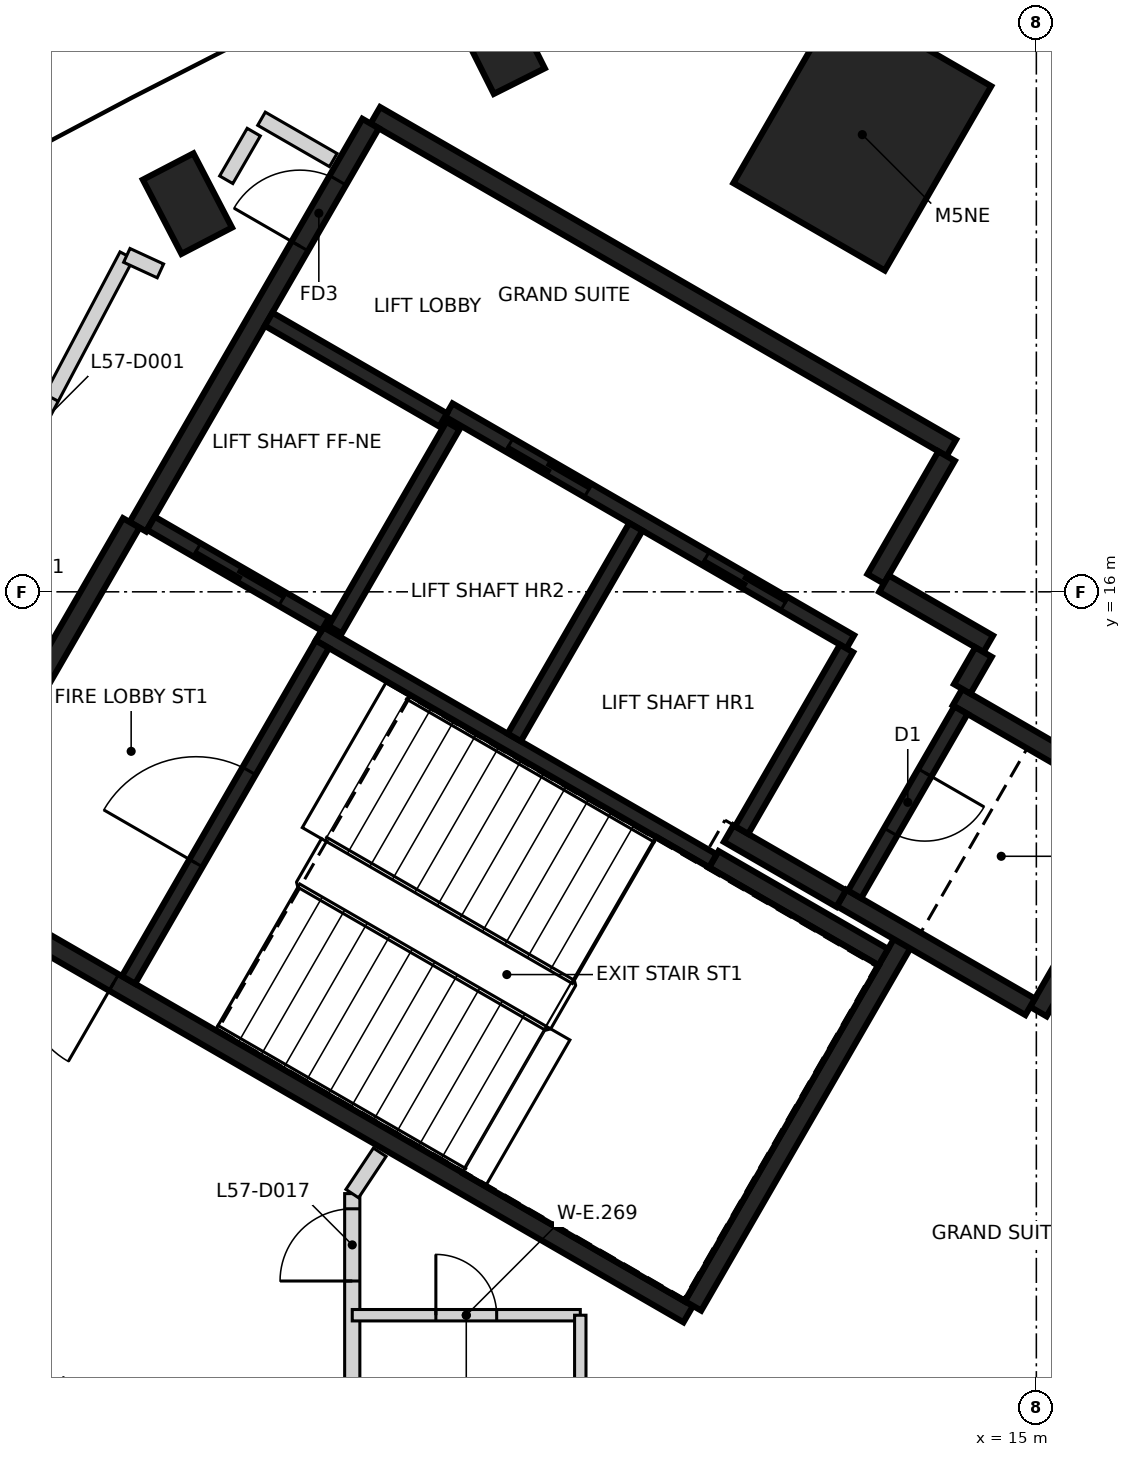
"""IFC4 building model, lengths in metres.
Left out: names, types, materials, properties, quantities, classifications, styles, units other than length and angle.
Written with IfcOpenShell. Run it as: python <this file> out.ifc"""

import sys

from ifc_helpers import new_model, si_unit, direction, frame, frame_2d, origin, origin_2d, place, context, subcontext, project, spatial, rectangle, extrude, element, fill, save


model = new_model("IFC4")
c1 = context("Model", 3, precision=1e-05, world=origin(), true_north=direction((0.0, 1.0)))
c2 = subcontext(c1, "Body", "Model", "MODEL_VIEW")
j1 = project(units=[si_unit("LENGTHUNIT", "METRE"), si_unit("PLANEANGLEUNIT", "RADIAN")], contexts=[c1])
p1 = place(None, origin())
s1 = spatial("IfcSite", under=j1, at=p1, CompositionType="ELEMENT")
p2 = place(p1, origin())
s2 = spatial("IfcBuilding", under=s1, at=p2, CompositionType="ELEMENT")
p3 = place(p2, frame((0.0, 0.0, 228.6)))
s3 = spatial("IfcBuildingStorey", under=s2, at=p3, CompositionType="ELEMENT", Elevation=228.6)
for number, where, z_axis, x_axis in (
    (1, (7.951, 23.211, -0.35), (0.0, 0.0, 1.0), (-0.449, 0.894, 0.0)),
    (2, (3.832, 21.107, -0.35), (0.0, 0.0, 1.0), (-0.461, 0.887, 0.0)),
):
    element("IfcColumn", number, at=place(p3, frame(where, z_axis=z_axis, x_axis=x_axis)), inside=s3, PredefinedType="COLUMN", context=c2, shape_type="SweptSolid", body=[
        extrude(rectangle(XDim=1.1, YDim=0.75, at=origin_2d()), origin(), (0.0, 0.0, 1.0), 3.6),
    ])
p4 = place(p3, frame((12.71, 22.015, -0.35), z_axis=(0.0, 0.0, 1.0), x_axis=(0.5, 0.866025403784, 0.0)))
e3 = element("IfcColumn", 3, at=p4, inside=s3, PredefinedType="COLUMN", context=c2, shape_type="SweptSolid", body=[
    extrude(rectangle(XDim=2.8, YDim=2.3, at=origin_2d()), origin(), (0.0, 0.0, 1.0), 3.6),
])
p5 = place(p3, frame((10.42, 6.498, 0.0), z_axis=(0.0, 0.0, 1.0), x_axis=(-0.866021906294, 0.500006057782, 0.0)))
e4 = element("IfcWall", 4, at=p5, inside=s3, PredefinedType="SHEAR", context=c2, shape_type="SweptSolid", body=[
    extrude(rectangle(XDim=11.55, YDim=0.25, at=frame_2d((5.775, 0.0))), origin(), (0.0, 0.0, 1.0), 3.25),
])
p6 = place(p5, frame((10.025, 0.0, 0.0)))
e5 = element("IfcOpeningElement", 5, at=p6, cuts=e4, PredefinedType="OPENING", context=c2, shape_type="SweptSolid", body=[
    extrude(rectangle(XDim=1.2, YDim=2.1, at=frame_2d((0.6, 1.05))), frame((0.0, 0.135, 0.0), z_axis=(0.0, -1.0, 0.0), x_axis=(1.0, 0.0, 0.0)), (0.0, 0.0, 1.0), 0.27),
])
p7 = place(p5, frame((8.725, 0.0, 0.0)))
e6 = element("IfcOpeningElement", 6, at=p7, cuts=e4, PredefinedType="OPENING", context=c2, shape_type="SweptSolid", body=[
    extrude(rectangle(XDim=1.2, YDim=2.1, at=frame_2d((0.6, 1.05))), frame((0.0, 0.135, 0.0), z_axis=(0.0, -1.0, 0.0), x_axis=(1.0, 0.0, 0.0)), (0.0, 0.0, 1.0), 0.27),
])
p8 = place(p3, frame((6.304, 22.269, 0.0), z_axis=(0.0, 0.0, 1.0), x_axis=(0.866022959057, -0.500004234368, 0.0)))
e7 = element("IfcWall", 7, at=p8, inside=s3, PredefinedType="SHEAR", context=c2, shape_type="SweptSolid", body=[
    extrude(rectangle(XDim=8.75, YDim=0.25, at=frame_2d((4.375, 0.0))), origin(), (0.0, 0.0, 1.0), 3.25),
])
p9 = place(p3, frame((3.179, 16.856, 0.0), z_axis=(0.0, 0.0, 1.0), x_axis=(0.500001955336, 0.866024274868, 0.0)))
e8 = element("IfcWall", 8, at=p9, inside=s3, PredefinedType="SHEAR", context=c2, shape_type="SweptSolid", body=[
    extrude(rectangle(XDim=6.125, YDim=0.25, at=frame_2d((3.062, 0.0))), origin(), (0.0, 0.0, 1.0), 3.25),
])
p10 = place(p9, frame((4.263, 0.0, 0.0)))
e9 = element("IfcOpeningElement", 9, at=p10, cuts=e8, PredefinedType="OPENING", context=c2, shape_type="SweptSolid", body=[
    extrude(rectangle(XDim=1.0, YDim=2.1, at=frame_2d((0.5, 1.05))), frame((0.0, 0.135, 0.0), z_axis=(0.0, -1.0, 0.0), x_axis=(1.0, 0.0, 0.0)), (0.0, 0.0, 1.0), 0.27),
])
p11 = place(p3, frame((0.48, 12.381, 0.0), z_axis=(0.0, 0.0, 1.0), x_axis=(0.49999885962, 0.866026062182, 0.0)))
e10 = element("IfcWall", 10, at=p11, inside=s3, PredefinedType="SHEAR", context=c2, shape_type="SweptSolid", body=[
    extrude(rectangle(XDim=5.225, YDim=0.25, at=frame_2d((2.612, 0.0))), origin(), (0.0, 0.0, 1.0), 3.25),
])
p12 = place(p3, frame((13.238, 11.378, 0.0), z_axis=(0.0, 0.0, 1.0), x_axis=(-0.500008851346, -0.866020293397, 0.0)))
e11 = element("IfcWall", 11, at=p12, inside=s3, PredefinedType="SHEAR", context=c2, shape_type="SweptSolid", body=[
    extrude(rectangle(XDim=5.51, YDim=0.25, at=frame_2d((2.755, 0.0))), origin(), (0.0, 0.0, 1.0), 3.25),
])
p13 = place(p3, frame((16.684, 13.347, 0.0), z_axis=(0.0, 0.0, 1.0), x_axis=(-0.499998874531, -0.866026053573, 0.0)))
e12 = element("IfcWall", 12, at=p13, inside=s3, PredefinedType="SHEAR", context=c2, shape_type="SweptSolid", body=[
    extrude(rectangle(XDim=3.313, YDim=0.25, at=frame_2d((1.656, 0.0))), origin(), (0.0, 0.0, 1.0), 3.25),
])
p14 = place(p3, frame((14.918, 10.54, 0.0), z_axis=(0.0, 0.0, 1.0), x_axis=(-0.866063538972, 0.499933942099, 0.0)))
e13 = element("IfcWall", 13, at=p14, inside=s3, PredefinedType="SHEAR", context=c2, shape_type="SweptSolid", body=[
    extrude(rectangle(XDim=2.865, YDim=0.25, at=frame_2d((1.432, 0.0))), origin(), (0.0, 0.0, 1.0), 3.25),
])
p15 = place(p3, frame((13.963, 14.614, 0.0), z_axis=(0.0, 0.0, 1.0), x_axis=(0.866042235819, -0.499970844928, 0.0)))
e14 = element("IfcWall", 14, at=p15, inside=s3, PredefinedType="SHEAR", context=c2, shape_type="SweptSolid", body=[
    extrude(rectangle(XDim=2.865, YDim=0.25, at=frame_2d((1.432, 0.0))), origin(), (0.0, 0.0, 1.0), 3.25),
])
p16 = place(p3, frame((10.757, 12.481, 0.0), z_axis=(0.0, 0.0, 1.0), x_axis=(0.866022940537, -0.500004266446, 0.0)))
e15 = element("IfcWall", 15, at=p16, inside=s3, PredefinedType="SHEAR", context=c2, shape_type="SweptSolid", body=[
    extrude(rectangle(XDim=2.575, YDim=0.25, at=frame_2d((1.287, 0.0))), origin(), (0.0, 0.0, 1.0), 3.25),
])
p17 = place(p3, frame((13.819, 17.785, 0.0), z_axis=(0.0, 0.0, 1.0), x_axis=(-0.500039802285, -0.866002422705, 0.0)))
e16 = element("IfcWall", 16, at=p17, inside=s3, PredefinedType="SHEAR", context=c2, shape_type="SweptSolid", body=[
    extrude(rectangle(XDim=1.865, YDim=0.25, at=frame_2d((0.932, 0.0))), origin(), (0.0, 0.0, 1.0), 3.25),
])
p18 = place(p3, frame((12.433, 11.964, 0.0), z_axis=(0.0, 0.0, 1.0), x_axis=(-0.866038183914, 0.499977863513, 0.0)))
e17 = element("IfcWall", 17, at=p18, inside=s3, PredefinedType="SHEAR", context=c2, shape_type="SweptSolid", body=[
    extrude(rectangle(XDim=1.71, YDim=0.25, at=frame_2d((0.855, 0.0))), origin(), (0.0, 0.0, 1.0), 3.25),
])
p19 = place(p3, frame((12.995, 16.108, 0.0), z_axis=(0.0, 0.0, 1.0), x_axis=(0.866044474677, -0.49996696679, 0.0)))
e18 = element("IfcWall", 18, at=p19, inside=s3, PredefinedType="SHEAR", context=c2, shape_type="SweptSolid", body=[
    extrude(rectangle(XDim=1.584, YDim=0.25, at=frame_2d((0.792, 0.0))), origin(), (0.0, 0.0, 1.0), 3.25),
])
p20 = place(p3, frame((14.305, 15.207, 0.0), z_axis=(0.0, 0.0, 1.0), x_axis=(-0.499848422343, -0.866112899501, 0.0)))
e19 = element("IfcWall", 19, at=p20, inside=s3, PredefinedType="SHEAR", context=c2, shape_type="SweptSolid", body=[
    extrude(rectangle(XDim=0.559, YDim=0.25, at=frame_2d((0.28, 0.0))), origin(), (0.0, 0.0, 1.0), 3.25),
])
p21 = place(p3, frame((12.552, 15.342, 0.0), z_axis=(0.0, 0.0, 1.0), x_axis=(-0.866030299012, 0.499991521122, 0.0)))
e20 = element("IfcWall", 20, at=p21, inside=s3, PredefinedType="SHEAR", context=c2, shape_type="SweptSolid", body=[
    extrude(rectangle(XDim=6.1, YDim=0.2, at=frame_2d((3.05, 0.0))), origin(), (0.0, 0.0, 1.0), 3.25),
])
p22 = place(p21, frame((1.0, 0.0, 0.0)))
e21 = element("IfcOpeningElement", 21, at=p22, cuts=e20, PredefinedType="OPENING", context=c2, shape_type="SweptSolid", body=[
    extrude(rectangle(XDim=1.2, YDim=2.1, at=frame_2d((0.6, 1.05))), frame((0.0, 0.11, 0.0), z_axis=(0.0, -1.0, 0.0), x_axis=(1.0, 0.0, 0.0)), (0.0, 0.0, 1.0), 0.22),
])
p23 = place(p21, frame((3.982, 0.0, 0.0)))
e22 = element("IfcOpeningElement", 22, at=p23, cuts=e20, PredefinedType="OPENING", context=c2, shape_type="SweptSolid", body=[
    extrude(rectangle(XDim=1.2, YDim=2.1, at=frame_2d((0.6, 1.05))), frame((0.0, 0.11, 0.0), z_axis=(0.0, -1.0, 0.0), x_axis=(1.0, 0.0, 0.0)), (0.0, 0.0, 1.0), 0.22),
])
p24 = place(p3, frame((10.743, 12.46, 0.0), z_axis=(0.0, 0.0, 1.0), x_axis=(-0.866018848283, 0.500011354289, 0.0)))
e23 = element("IfcWall", 23, at=p24, inside=s3, PredefinedType="SHEAR", context=c2, shape_type="SweptSolid", body=[
    extrude(rectangle(XDim=5.974, YDim=0.2, at=frame_2d((2.987, 0.0))), origin(), (0.0, 0.0, 1.0), 3.25),
])
p25 = place(p3, frame((3.057, 10.895, 0.0), z_axis=(0.0, 0.0, 1.0), x_axis=(0.500027839223, 0.866009330205, 0.0)))
e24 = element("IfcWall", 24, at=p25, inside=s3, PredefinedType="SHEAR", context=c2, shape_type="SweptSolid", body=[
    extrude(rectangle(XDim=5.098, YDim=0.2, at=frame_2d((2.549, 0.0))), origin(), (0.0, 0.0, 1.0), 3.25),
])
p26 = place(p25, frame((1.774, 0.0, 0.0)))
e25 = element("IfcOpeningElement", 25, at=p26, cuts=e24, PredefinedType="OPENING", context=c2, shape_type="SweptSolid", body=[
    extrude(rectangle(XDim=1.4, YDim=2.1, at=frame_2d((0.7, 1.05))), frame((0.0, 0.11, 0.0), z_axis=(0.0, -1.0, 0.0), x_axis=(1.0, 0.0, 0.0)), (0.0, 0.0, 1.0), 0.22),
])
p27 = place(p3, frame((8.132, 14.084, 0.0), z_axis=(0.0, 0.0, 1.0), x_axis=(0.500030834389, 0.86600760081, 0.0)))
e26 = element("IfcWall", 26, at=p27, inside=s3, PredefinedType="SHEAR", context=c2, shape_type="SweptSolid", body=[
    extrude(rectangle(XDim=3.198, YDim=0.2, at=frame_2d((1.599, 0.0))), origin(), (0.0, 0.0, 1.0), 3.25),
])
p28 = place(p3, frame((14.008, 14.442, 0.0), z_axis=(0.0, 0.0, 1.0), x_axis=(-0.499986818241, -0.866033014143, 0.0)))
e27 = element("IfcWall", 27, at=p28, inside=s3, PredefinedType="SHEAR", context=c2, shape_type="SweptSolid", body=[
    extrude(rectangle(XDim=2.798, YDim=0.2, at=frame_2d((1.399, 0.0))), origin(), (0.0, 0.0, 1.0), 3.25),
])
p29 = place(p28, frame((0.949, 0.0, 0.0)))
e28 = element("IfcOpeningElement", 28, at=p29, cuts=e27, PredefinedType="OPENING", context=c2, shape_type="SweptSolid", body=[
    extrude(rectangle(XDim=0.9, YDim=2.1, at=frame_2d((0.45, 1.05))), frame((0.0, 0.11, 0.0), z_axis=(0.0, -1.0, 0.0), x_axis=(1.0, 0.0, 0.0)), (0.0, 0.0, 1.0), 0.22),
])
p30 = place(p3, frame((12.502, 15.255, 0.0), z_axis=(0.0, 0.0, 1.0), x_axis=(-0.499965018551, -0.866045599391, 0.0)))
e29 = element("IfcWall", 29, at=p30, inside=s3, PredefinedType="SHEAR", context=c2, shape_type="SweptSolid", body=[
    extrude(rectangle(XDim=2.759, YDim=0.2, at=frame_2d((1.379, 0.0))), origin(), (0.0, 0.0, 1.0), 3.25),
])
p31 = place(p3, frame((7.324, 18.187, 0.0), z_axis=(0.0, 0.0, 1.0), x_axis=(-0.499967891604, -0.866043940782, 0.0)))
e30 = element("IfcWall", 30, at=p31, inside=s3, PredefinedType="SHEAR", context=c2, shape_type="SweptSolid", body=[
    extrude(rectangle(XDim=3.1, YDim=0.2, at=frame_2d((1.55, 0.0))), origin(), (0.0, 0.0, 1.0), 3.25),
])
p32 = place(p3, frame((5.646, 15.576, 0.0), z_axis=(0.0, 0.0, 1.0), x_axis=(-0.866018407898, 0.500012117035, 0.0)))
e31 = element("IfcWall", 31, at=p32, inside=s3, PredefinedType="SHEAR", context=c2, shape_type="SweptSolid", body=[
    extrude(rectangle(XDim=2.651, YDim=0.2, at=frame_2d((1.325, 0.0))), origin(), (0.0, 0.0, 1.0), 3.25),
])
p33 = place(p32, frame((0.652, 0.0, 0.0)))
e32 = element("IfcOpeningElement", 32, at=p33, cuts=e31, PredefinedType="OPENING", context=c2, shape_type="SweptSolid", body=[
    extrude(rectangle(XDim=1.3, YDim=2.1, at=frame_2d((0.65, 1.05))), frame((0.0, 0.11, 0.0), z_axis=(0.0, -1.0, 0.0), x_axis=(1.0, 0.0, 0.0)), (0.0, 0.0, 1.0), 0.22),
])
p34 = place(p3, frame((7.196, 18.26, 0.0), z_axis=(0.0, 0.0, 1.0), x_axis=(-0.866018407898, 0.500012117035, 0.0)))
e33 = element("IfcWall", 33, at=p34, inside=s3, PredefinedType="SHEAR", context=c2, shape_type="SweptSolid", body=[
    extrude(rectangle(XDim=2.651, YDim=0.2, at=frame_2d((1.325, 0.0))), origin(), (0.0, 0.0, 1.0), 3.25),
])
p35 = place(p3, frame((-1.035, 12.73, 0.0), z_axis=(0.0, 0.0, 1.0), x_axis=(0.46738248691, 0.884055208078, 0.0)))
e34 = element("IfcWall", 34, at=p35, inside=s3, PredefinedType="PARTITIONING", context=c2, shape_type="SweptSolid", body=[
    extrude(rectangle(XDim=8.705, YDim=0.2, at=frame_2d((4.352, 0.0))), origin(), (0.0, 0.0, 1.0), 3.25),
])
p36 = place(p35, frame((5.638, 0.0, 0.0)))
e35 = element("IfcOpeningElement", 35, at=p36, cuts=e34, PredefinedType="OPENING", context=c2, shape_type="SweptSolid", body=[
    extrude(rectangle(XDim=0.95, YDim=2.1, at=frame_2d((0.475, 1.05))), frame((0.0, 0.11, 0.0), z_axis=(0.0, -1.0, 0.0), x_axis=(1.0, 0.0, 0.0)), (0.0, 0.0, 1.0), 0.22),
])
p37 = place(p3, frame((3.034, 20.426, 0.0), z_axis=(0.0, 0.0, 1.0), x_axis=(0.907930035436, -0.41912176125, 0.0)))
e36 = element("IfcWall", 36, at=p37, inside=s3, PredefinedType="PARTITIONING", context=c2, shape_type="SweptSolid", body=[
    extrude(rectangle(XDim=0.487, YDim=0.2, at=frame_2d((0.244, 0.0))), origin(), (0.0, 0.0, 1.0), 3.25),
])
p38 = place(p3, frame((4.342, 21.421, 0.0), z_axis=(0.0, 0.0, 1.0), x_axis=(0.500238258503, 0.865887801468, 0.0)))
e37 = element("IfcWall", 37, at=p38, inside=s3, PredefinedType="PARTITIONING", context=c2, shape_type="SweptSolid", body=[
    extrude(rectangle(XDim=0.724, YDim=0.2, at=frame_2d((0.362, 0.0))), origin(), (0.0, 0.0, 1.0), 2.35),
])
p39 = place(p3, frame((4.806, 22.224, 0.0), z_axis=(0.0, 0.0, 1.0), x_axis=(0.866334698307, -0.499463903109, 0.0)))
e38 = element("IfcWall", 38, at=p39, inside=s3, PredefinedType="PARTITIONING", context=c2, shape_type="SweptSolid", body=[
    extrude(rectangle(XDim=1.09, YDim=0.2, at=frame_2d((0.545, 0.0))), origin(), (0.0, 0.0, 1.0), 2.35),
])
p40 = place(p3, frame((6.0, -4.721, 0.0), z_axis=(0.0, 0.0, 1.0), x_axis=(0.0, 1.0, 0.0)))
e39 = element("IfcWall", 39, at=p40, inside=s3, PredefinedType="PARTITIONING", context=c2, shape_type="SweptSolid", body=[
    extrude(rectangle(XDim=12.804, YDim=0.2, at=frame_2d((6.402, 0.0))), origin(), (0.0, 0.0, 1.0), 3.25),
])
p41 = place(p40, frame((3.979, 0.0, 0.0)))
e40 = element("IfcOpeningElement", 40, at=p41, cuts=e39, PredefinedType="OPENING", context=c2, shape_type="SweptSolid", body=[
    extrude(rectangle(XDim=1.4, YDim=2.1, at=frame_2d((0.7, 1.05))), frame((0.0, 0.11, 0.0), z_axis=(0.0, -1.0, 0.0), x_axis=(1.0, 0.0, 0.0)), (0.0, 0.0, 1.0), 0.22),
])
p42 = place(p40, frame((11.654, 0.0, 0.0)))
e41 = element("IfcOpeningElement", 41, at=p42, cuts=e39, PredefinedType="OPENING", context=c2, shape_type="SweptSolid", body=[
    extrude(rectangle(XDim=0.95, YDim=2.1, at=frame_2d((0.475, 1.05))), frame((0.0, 0.11, 0.0), z_axis=(0.0, -1.0, 0.0), x_axis=(1.0, 0.0, 0.0)), (0.0, 0.0, 1.0), 0.22),
])
p43 = place(p3, frame((6.0, 8.083, 0.0), z_axis=(0.0, 0.0, 1.0), x_axis=(0.553665201502, 0.832739361773, 0.0)))
e42 = element("IfcWall", 42, at=p43, inside=s3, PredefinedType="PARTITIONING", context=c2, shape_type="SweptSolid", body=[
    extrude(rectangle(XDim=0.654, YDim=0.2, at=frame_2d((0.327, 0.0))), origin(), (0.0, 0.0, 1.0), 3.25),
])
p44 = place(p3, frame((6.0, 6.483, 0.0), z_axis=(0.0, 0.0, 1.0), x_axis=(1.0, 0.0, 0.0)))
e43 = element("IfcWall", 43, at=p44, inside=s3, PredefinedType="PARTITIONING", context=c2, shape_type="SweptSolid", body=[
    extrude(rectangle(XDim=3.0, YDim=0.15, at=frame_2d((1.5, 0.0))), origin(), (0.0, 0.0, 1.0), 3.25),
])
p45 = place(p44, frame((1.1, 0.0, 0.0)))
e44 = element("IfcOpeningElement", 44, at=p45, cuts=e43, PredefinedType="OPENING", context=c2, shape_type="SweptSolid", body=[
    extrude(rectangle(XDim=0.8, YDim=2.1, at=frame_2d((0.4, 1.05))), frame((0.0, 0.085, 0.0), z_axis=(0.0, -1.0, 0.0), x_axis=(1.0, 0.0, 0.0)), (0.0, 0.0, 1.0), 0.17),
])
p46 = place(p3, frame((9.0, 4.625, 0.0), z_axis=(0.0, 0.0, 1.0), x_axis=(0.0, 1.0, 0.0)))
e45 = element("IfcWall", 45, at=p46, inside=s3, PredefinedType="PARTITIONING", context=c2, shape_type="SweptSolid", body=[
    extrude(rectangle(XDim=1.858, YDim=0.15, at=frame_2d((0.929, 0.0))), origin(), (0.0, 0.0, 1.0), 3.25),
])
p47 = place(p33, origin())
e46 = element("IfcDoor", 46, at=p47, inside=s3, OperationType="SLIDING_TO_LEFT", PredefinedType="DOOR", context=c2, shape_type="SweptSolid", body=[
    extrude(rectangle(XDim=1.3, YDim=2.1, at=frame_2d((0.65, 1.05))), frame((0.0, 0.025, 0.0), z_axis=(0.0, -1.0, 0.0), x_axis=(1.0, 0.0, 0.0)), (0.0, 0.0, 1.0), 0.05),
])
fill(e32, e46)
p48 = place(p22, origin())
e47 = element("IfcDoor", 47, at=p48, inside=s3, OperationType="DOUBLE_DOOR_SLIDING", PredefinedType="DOOR", context=c2, shape_type="SweptSolid", body=[
    extrude(rectangle(XDim=1.2, YDim=2.1, at=frame_2d((0.6, 1.05))), frame((0.0, 0.025, 0.0), z_axis=(0.0, -1.0, 0.0), x_axis=(1.0, 0.0, 0.0)), (0.0, 0.0, 1.0), 0.05),
])
fill(e21, e47)
p49 = place(p23, origin())
e48 = element("IfcDoor", 48, at=p49, inside=s3, OperationType="DOUBLE_DOOR_SLIDING", PredefinedType="DOOR", context=c2, shape_type="SweptSolid", body=[
    extrude(rectangle(XDim=1.2, YDim=2.1, at=frame_2d((0.6, 1.05))), frame((0.0, 0.025, 0.0), z_axis=(0.0, -1.0, 0.0), x_axis=(1.0, 0.0, 0.0)), (0.0, 0.0, 1.0), 0.05),
])
fill(e22, e48)
p50 = place(p10, origin())
e49 = element("IfcDoor", 49, at=p50, inside=s3, OperationType="SINGLE_SWING_LEFT", PredefinedType="DOOR", context=c2, shape_type="SweptSolid", body=[
    extrude(rectangle(XDim=1.0, YDim=2.1, at=frame_2d((0.5, 1.05))), frame((0.0, 0.025, 0.0), z_axis=(0.0, -1.0, 0.0), x_axis=(1.0, 0.0, 0.0)), (0.0, 0.0, 1.0), 0.05),
])
fill(e9, e49)
p51 = place(p7, origin())
e50 = element("IfcDoor", 50, at=p51, inside=s3, OperationType="SINGLE_SWING_RIGHT", PredefinedType="DOOR", context=c2, shape_type="SweptSolid", body=[
    extrude(rectangle(XDim=1.2, YDim=2.1, at=frame_2d((0.6, 1.05))), frame((0.0, 0.025, 0.0), z_axis=(0.0, -1.0, 0.0), x_axis=(1.0, 0.0, 0.0)), (0.0, 0.0, 1.0), 0.05),
])
fill(e6, e50)
p52 = place(p26, origin())
e51 = element("IfcDoor", 51, at=p52, inside=s3, OperationType="SINGLE_SWING_LEFT", PredefinedType="DOOR", context=c2, shape_type="SweptSolid", body=[
    extrude(rectangle(XDim=1.4, YDim=2.1, at=frame_2d((0.7, 1.05))), frame((0.0, 0.025, 0.0), z_axis=(0.0, -1.0, 0.0), x_axis=(1.0, 0.0, 0.0)), (0.0, 0.0, 1.0), 0.05),
])
fill(e25, e51)
p53 = place(p29, origin())
e52 = element("IfcDoor", 52, at=p53, inside=s3, OperationType="SINGLE_SWING_RIGHT", PredefinedType="DOOR", context=c2, shape_type="SweptSolid", body=[
    extrude(rectangle(XDim=0.9, YDim=2.1, at=frame_2d((0.45, 1.05))), frame((0.0, 0.025, 0.0), z_axis=(0.0, -1.0, 0.0), x_axis=(1.0, 0.0, 0.0)), (0.0, 0.0, 1.0), 0.05),
])
fill(e28, e52)
p54 = place(p36, frame((0.95, 0.0, 0.0), z_axis=(0.0, 0.0, 1.0), x_axis=(-1.0, 0.0, 0.0)))
e53 = element("IfcDoor", 53, at=p54, inside=s3, OperationType="SINGLE_SWING_LEFT", PredefinedType="DOOR", context=c2, shape_type="SweptSolid", body=[
    extrude(rectangle(XDim=0.95, YDim=2.1, at=frame_2d((0.475, 1.05))), frame((0.0, 0.025, 0.0), z_axis=(0.0, -1.0, 0.0), x_axis=(1.0, 0.0, 0.0)), (0.0, 0.0, 1.0), 0.05),
])
fill(e35, e53)
p55 = place(p42, frame((0.95, 0.0, 0.0), z_axis=(0.0, 0.0, 1.0), x_axis=(-1.0, 0.0, 0.0)))
e54 = element("IfcDoor", 54, at=p55, inside=s3, OperationType="SINGLE_SWING_LEFT", PredefinedType="DOOR", context=c2, shape_type="SweptSolid", body=[
    extrude(rectangle(XDim=0.95, YDim=2.1, at=frame_2d((0.475, 1.05))), frame((0.0, 0.025, 0.0), z_axis=(0.0, -1.0, 0.0), x_axis=(1.0, 0.0, 0.0)), (0.0, 0.0, 1.0), 0.05),
])
fill(e41, e54)
p56 = place(p45, origin())
e55 = element("IfcDoor", 55, at=p56, inside=s3, OperationType="SINGLE_SWING_LEFT", PredefinedType="DOOR", context=c2, shape_type="SweptSolid", body=[
    extrude(rectangle(XDim=0.8, YDim=2.1, at=frame_2d((0.4, 1.05))), frame((0.0, 0.025, 0.0), z_axis=(0.0, -1.0, 0.0), x_axis=(1.0, 0.0, 0.0)), (0.0, 0.0, 1.0), 0.05),
])
fill(e44, e55)
save(model, sys.argv[1])
